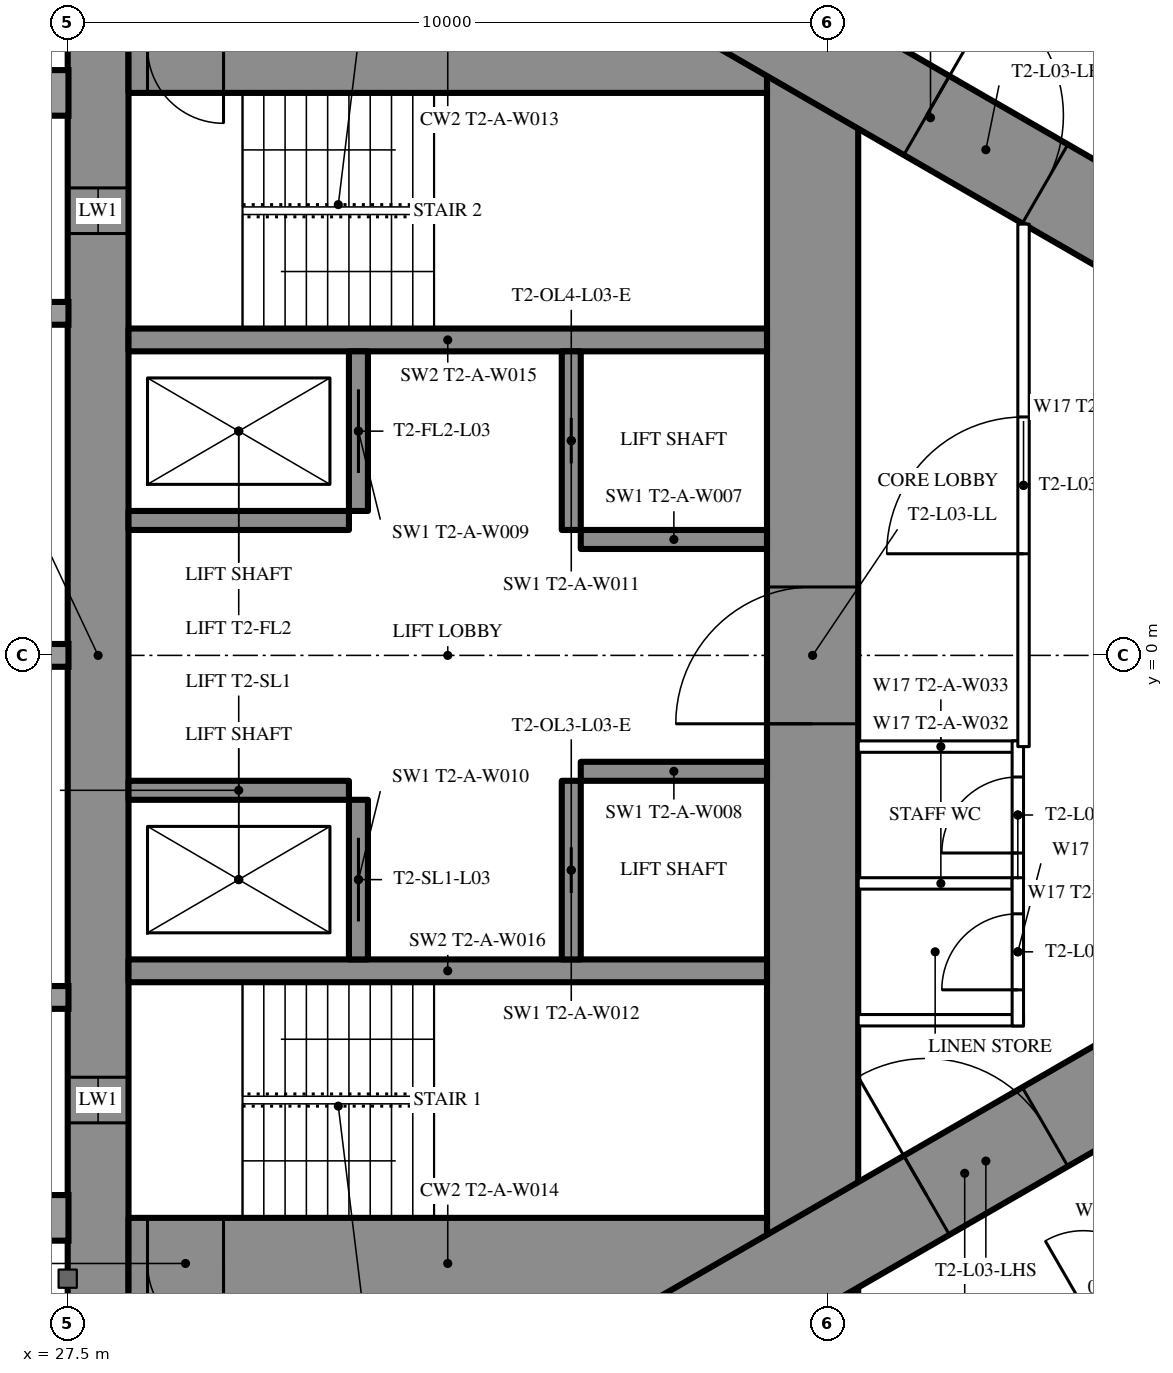
"""IFC4 building model, lengths in metres.
Left out: names, types, materials, properties, quantities, classifications, styles, units other than length and angle.
Written with IfcOpenShell. Run it as: python <this file> out.ifc"""

import sys

from ifc_helpers import new_model, si_unit, direction, frame, frame_2d, origin, place, context, subcontext, project, spatial, rectangle, extrude, element, fill, save


model = new_model("IFC4")
c1 = context("Model", 3, precision=1e-05, world=origin(), true_north=direction((0.0, 1.0)))
c2 = subcontext(c1, "Body", "Model", "MODEL_VIEW")
j1 = project(units=[si_unit("LENGTHUNIT", "METRE"), si_unit("PLANEANGLEUNIT", "RADIAN")], contexts=[c1])
p1 = place(None, origin())
s1 = spatial("IfcSite", under=j1, at=p1, CompositionType="ELEMENT")
p2 = place(p1, origin())
s2 = spatial("IfcBuilding", under=s1, at=p2, CompositionType="ELEMENT")
p3 = place(p2, frame((0.0, 0.0, 18.0)))
s3 = spatial("IfcBuildingStorey", under=s2, at=p3, CompositionType="ELEMENT", Elevation=18.0)
p4 = place(p3, frame((27.9, -8.6, 0.0), z_axis=(0.0, 0.0, 1.0), x_axis=(0.0, 1.0, 0.0)))
e1 = element("IfcWall", 1, at=p4, inside=s3, PredefinedType="SHEAR", context=c2, shape_type="SweptSolid", body=[
    extrude(rectangle(XDim=17.2, YDim=0.8, at=frame_2d((8.6, 0.0))), origin(), (0.0, 0.0, 1.0), 3.5),
])
p5 = place(p4, frame((2.45, 0.0, 0.6)))
e2 = element("IfcOpeningElement", 2, at=p5, cuts=e1, PredefinedType="OPENING", context=c2, shape_type="SweptSolid", body=[
    extrude(rectangle(XDim=0.6, YDim=2.1, at=frame_2d((0.3, 1.05))), frame((0.0, 0.41, 0.0), z_axis=(0.0, -1.0, 0.0), x_axis=(1.0, 0.0, 0.0)), (0.0, 0.0, 1.0), 0.82),
])
p6 = place(p4, frame((14.15, 0.0, 0.6)))
e3 = element("IfcOpeningElement", 3, at=p6, cuts=e1, PredefinedType="OPENING", context=c2, shape_type="SweptSolid", body=[
    extrude(rectangle(XDim=0.6, YDim=2.1, at=frame_2d((0.3, 1.05))), frame((0.0, 0.41, 0.0), z_axis=(0.0, -1.0, 0.0), x_axis=(1.0, 0.0, 0.0)), (0.0, 0.0, 1.0), 0.82),
])
p7 = place(p3, frame((37.3, -8.6, 0.0), z_axis=(0.0, 0.0, 1.0), x_axis=(0.0, 1.0, 0.0)))
e4 = element("IfcWall", 4, at=p7, inside=s3, PredefinedType="SHEAR", context=c2, shape_type="SweptSolid", body=[
    extrude(rectangle(XDim=17.2, YDim=1.2, at=frame_2d((8.6, 0.0))), origin(), (0.0, 0.0, 1.0), 3.5),
])
p8 = place(p7, frame((7.7, 0.0, 0.0)))
e5 = element("IfcOpeningElement", 5, at=p8, cuts=e4, PredefinedType="OPENING", context=c2, shape_type="SweptSolid", body=[
    extrude(rectangle(XDim=1.8, YDim=2.2, at=frame_2d((0.9, 1.1))), frame((0.0, 0.61, 0.0), z_axis=(0.0, -1.0, 0.0), x_axis=(1.0, 0.0, 0.0)), (0.0, 0.0, 1.0), 1.22),
])
p9 = place(p3, frame((28.3, -8.0, 0.0), z_axis=(0.0, 0.0, 1.0), x_axis=(1.0, 0.0, 0.0)))
e6 = element("IfcWall", 6, at=p9, inside=s3, PredefinedType="SHEAR", context=c2, shape_type="SweptSolid", body=[
    extrude(rectangle(XDim=8.4, YDim=1.2, at=frame_2d((4.2, 0.0))), origin(), (0.0, 0.0, 1.0), 3.5),
])
p10 = place(p9, frame((0.25, 0.0, 0.0)))
e7 = element("IfcOpeningElement", 7, at=p10, cuts=e6, PredefinedType="OPENING", context=c2, shape_type="SweptSolid", body=[
    extrude(rectangle(XDim=1.0, YDim=2.2, at=frame_2d((0.5, 1.1))), frame((0.0, 0.61, 0.0), z_axis=(0.0, -1.0, 0.0), x_axis=(1.0, 0.0, 0.0)), (0.0, 0.0, 1.0), 1.22),
])
p11 = place(p3, frame((28.3, 8.0, 0.0), z_axis=(0.0, 0.0, 1.0), x_axis=(1.0, 0.0, 0.0)))
e8 = element("IfcWall", 8, at=p11, inside=s3, PredefinedType="SHEAR", context=c2, shape_type="SweptSolid", body=[
    extrude(rectangle(XDim=8.4, YDim=1.2, at=frame_2d((4.2, 0.0))), origin(), (0.0, 0.0, 1.0), 3.5),
])
p12 = place(p11, frame((0.25, 0.0, 0.0)))
e9 = element("IfcOpeningElement", 9, at=p12, cuts=e8, PredefinedType="OPENING", context=c2, shape_type="SweptSolid", body=[
    extrude(rectangle(XDim=1.0, YDim=2.2, at=frame_2d((0.5, 1.1))), frame((0.0, 0.61, 0.0), z_axis=(0.0, -1.0, 0.0), x_axis=(1.0, 0.0, 0.0)), (0.0, 0.0, 1.0), 1.22),
])
for number, where, z_axis, x_axis in (
    (10, (28.3, -4.15, 0.0), (0.0, 0.0, 1.0), (1.0, 0.0, 0.0)),
    (11, (28.3, 4.15, 0.0), (0.0, 0.0, 1.0), (1.0, 0.0, 0.0)),
):
    element("IfcWall", number, at=place(p3, frame(where, z_axis=z_axis, x_axis=x_axis)), inside=s3, PredefinedType="SHEAR", context=c2, shape_type="SweptSolid", body=[
        extrude(rectangle(XDim=8.4, YDim=0.3, at=frame_2d((4.2, 0.0))), origin(), (0.0, 0.0, 1.0), 3.5),
    ])
p13 = place(p3, frame((31.325, -4.0, 0.0), z_axis=(0.0, 0.0, 1.0), x_axis=(0.0, 1.0, 0.0)))
e12 = element("IfcWall", 12, at=p13, inside=s3, PredefinedType="SHEAR", context=c2, shape_type="SweptSolid", body=[
    extrude(rectangle(XDim=2.1, YDim=0.25, at=frame_2d((1.05, 0.0))), origin(), (0.0, 0.0, 1.0), 3.5),
])
p14 = place(p13, frame((0.5, 0.0, 0.0)))
e13 = element("IfcOpeningElement", 13, at=p14, cuts=e12, PredefinedType="OPENING", context=c2, shape_type="SweptSolid", body=[
    extrude(rectangle(XDim=1.1, YDim=2.2, at=frame_2d((0.55, 1.1))), frame((0.0, 0.135, 0.0), z_axis=(0.0, -1.0, 0.0), x_axis=(1.0, 0.0, 0.0)), (0.0, 0.0, 1.0), 0.27),
])
p15 = place(p3, frame((34.125, -4.0, 0.0), z_axis=(0.0, 0.0, 1.0), x_axis=(0.0, 1.0, 0.0)))
e14 = element("IfcWall", 14, at=p15, inside=s3, PredefinedType="SHEAR", context=c2, shape_type="SweptSolid", body=[
    extrude(rectangle(XDim=2.35, YDim=0.25, at=frame_2d((1.175, 0.0))), origin(), (0.0, 0.0, 1.0), 3.5),
])
p16 = place(p15, frame((0.875, 0.0, 0.0)))
e15 = element("IfcOpeningElement", 15, at=p16, cuts=e14, PredefinedType="OPENING", context=c2, shape_type="SweptSolid", body=[
    extrude(rectangle(XDim=0.6, YDim=2.0, at=frame_2d((0.3, 1.0))), frame((0.0, 0.135, 0.0), z_axis=(0.0, -1.0, 0.0), x_axis=(1.0, 0.0, 0.0)), (0.0, 0.0, 1.0), 0.27),
])
p17 = place(p3, frame((28.3, -1.775, 0.0), z_axis=(0.0, 0.0, 1.0), x_axis=(1.0, 0.0, 0.0)))
e16 = element("IfcWall", 16, at=p17, inside=s3, PredefinedType="SHEAR", context=c2, shape_type="SweptSolid", body=[
    extrude(rectangle(XDim=2.9, YDim=0.25, at=frame_2d((1.45, 0.0))), origin(), (0.0, 0.0, 1.0), 3.5),
])
p18 = place(p3, frame((34.25, -1.525, 0.0), z_axis=(0.0, 0.0, 1.0), x_axis=(1.0, 0.0, 0.0)))
e17 = element("IfcWall", 17, at=p18, inside=s3, PredefinedType="SHEAR", context=c2, shape_type="SweptSolid", body=[
    extrude(rectangle(XDim=2.45, YDim=0.25, at=frame_2d((1.225, 0.0))), origin(), (0.0, 0.0, 1.0), 3.5),
])
p19 = place(p3, frame((31.325, 1.9, 0.0), z_axis=(0.0, 0.0, 1.0), x_axis=(0.0, 1.0, 0.0)))
e18 = element("IfcWall", 18, at=p19, inside=s3, PredefinedType="SHEAR", context=c2, shape_type="SweptSolid", body=[
    extrude(rectangle(XDim=2.1, YDim=0.25, at=frame_2d((1.05, 0.0))), origin(), (0.0, 0.0, 1.0), 3.5),
])
p20 = place(p19, frame((0.5, 0.0, 0.0)))
e19 = element("IfcOpeningElement", 19, at=p20, cuts=e18, PredefinedType="OPENING", context=c2, shape_type="SweptSolid", body=[
    extrude(rectangle(XDim=1.1, YDim=2.2, at=frame_2d((0.55, 1.1))), frame((0.0, 0.135, 0.0), z_axis=(0.0, -1.0, 0.0), x_axis=(1.0, 0.0, 0.0)), (0.0, 0.0, 1.0), 0.27),
])
p21 = place(p3, frame((34.125, 1.65, 0.0), z_axis=(0.0, 0.0, 1.0), x_axis=(0.0, 1.0, 0.0)))
e20 = element("IfcWall", 20, at=p21, inside=s3, PredefinedType="SHEAR", context=c2, shape_type="SweptSolid", body=[
    extrude(rectangle(XDim=2.35, YDim=0.25, at=frame_2d((1.175, 0.0))), origin(), (0.0, 0.0, 1.0), 3.5),
])
p22 = place(p21, frame((0.875, 0.0, 0.0)))
e21 = element("IfcOpeningElement", 21, at=p22, cuts=e20, PredefinedType="OPENING", context=c2, shape_type="SweptSolid", body=[
    extrude(rectangle(XDim=0.6, YDim=2.0, at=frame_2d((0.3, 1.0))), frame((0.0, 0.135, 0.0), z_axis=(0.0, -1.0, 0.0), x_axis=(1.0, 0.0, 0.0)), (0.0, 0.0, 1.0), 0.27),
])
p23 = place(p3, frame((28.3, 1.775, 0.0), z_axis=(0.0, 0.0, 1.0), x_axis=(1.0, 0.0, 0.0)))
e22 = element("IfcWall", 22, at=p23, inside=s3, PredefinedType="SHEAR", context=c2, shape_type="SweptSolid", body=[
    extrude(rectangle(XDim=2.9, YDim=0.25, at=frame_2d((1.45, 0.0))), origin(), (0.0, 0.0, 1.0), 3.5),
])
p24 = place(p3, frame((34.25, 1.525, 0.0), z_axis=(0.0, 0.0, 1.0), x_axis=(1.0, 0.0, 0.0)))
e23 = element("IfcWall", 23, at=p24, inside=s3, PredefinedType="SHEAR", context=c2, shape_type="SweptSolid", body=[
    extrude(rectangle(XDim=2.45, YDim=0.25, at=frame_2d((1.225, 0.0))), origin(), (0.0, 0.0, 1.0), 3.5),
])
p25 = place(p3, frame((27.2, -13.8, 0.0), z_axis=(0.0, 0.0, 1.0), x_axis=(0.866027159892, 0.499996958321, 0.0)))
e24 = element("IfcWall", 24, at=p25, inside=s3, PredefinedType="SHEAR", context=c2, shape_type="SweptSolid", body=[
    extrude(rectangle(XDim=27.947, YDim=1.2, at=frame_2d((13.973, 0.0))), origin(), (0.0, 0.0, 1.0), 3.5),
])
p26 = place(p25, frame((4.6, 0.0, 0.0)))
e25 = element("IfcOpeningElement", 25, at=p26, cuts=e24, PredefinedType="OPENING", context=c2, shape_type="SweptSolid", body=[
    extrude(rectangle(XDim=1.0, YDim=2.2, at=frame_2d((0.5, 1.1))), frame((0.0, 0.61, 0.0), z_axis=(0.0, -1.0, 0.0), x_axis=(1.0, 0.0, 0.0)), (0.0, 0.0, 1.0), 1.22),
])
p27 = place(p25, frame((13.395, 0.0, 0.0)))
e26 = element("IfcOpeningElement", 26, at=p27, cuts=e24, PredefinedType="OPENING", context=c2, shape_type="SweptSolid", body=[
    extrude(rectangle(XDim=1.8, YDim=2.2, at=frame_2d((0.9, 1.1))), frame((0.0, 0.61, 0.0), z_axis=(0.0, -1.0, 0.0), x_axis=(1.0, 0.0, 0.0)), (0.0, 0.0, 1.0), 1.22),
])
p28 = place(p3, frame((27.2, 13.8, 0.0), z_axis=(0.0, 0.0, 1.0), x_axis=(0.866024515034, -0.500001539357, 0.0)))
e27 = element("IfcWall", 27, at=p28, inside=s3, PredefinedType="SHEAR", context=c2, shape_type="SweptSolid", body=[
    extrude(rectangle(XDim=26.907, YDim=1.2, at=frame_2d((13.454, 0.0))), origin(), (0.0, 0.0, 1.0), 3.5),
])
p29 = place(p28, frame((4.6, 0.0, 0.0)))
e28 = element("IfcOpeningElement", 28, at=p29, cuts=e27, PredefinedType="OPENING", context=c2, shape_type="SweptSolid", body=[
    extrude(rectangle(XDim=1.0, YDim=2.2, at=frame_2d((0.5, 1.1))), frame((0.0, 0.61, 0.0), z_axis=(0.0, -1.0, 0.0), x_axis=(1.0, 0.0, 0.0)), (0.0, 0.0, 1.0), 1.22),
])
p30 = place(p28, frame((13.395, 0.0, 0.0)))
e29 = element("IfcOpeningElement", 29, at=p30, cuts=e27, PredefinedType="OPENING", context=c2, shape_type="SweptSolid", body=[
    extrude(rectangle(XDim=1.8, YDim=2.2, at=frame_2d((0.9, 1.1))), frame((0.0, 0.61, 0.0), z_axis=(0.0, -1.0, 0.0), x_axis=(1.0, 0.0, 0.0)), (0.0, 0.0, 1.0), 1.22),
])
p31 = place(p3, frame((36.834, 10.894, 0.0), z_axis=(0.0, 0.0, 1.0), x_axis=(0.866028157229, -0.499995230863, 0.0)))
e30 = element("IfcWall", 30, at=p31, inside=s3, PredefinedType="PARTITIONING", context=c2, shape_type="SweptSolid", body=[
    extrude(rectangle(XDim=21.667, YDim=0.2, at=frame_2d((10.833, 0.0))), origin(), (0.0, 0.0, 1.0), 3.25),
])
p32 = place(p31, frame((18.885, 0.0, 0.0)))
e31 = element("IfcOpeningElement", 31, at=p32, cuts=e30, PredefinedType="OPENING", context=c2, shape_type="SweptSolid", body=[
    extrude(rectangle(XDim=0.95, YDim=2.2, at=frame_2d((0.475, 1.1))), frame((0.0, 0.11, 0.0), z_axis=(0.0, -1.0, 0.0), x_axis=(1.0, 0.0, 0.0)), (0.0, 0.0, 1.0), 0.22),
])
p33 = place(p31, frame((14.835, 0.0, 0.0)))
e32 = element("IfcOpeningElement", 32, at=p33, cuts=e30, PredefinedType="OPENING", context=c2, shape_type="SweptSolid", body=[
    extrude(rectangle(XDim=0.95, YDim=2.2, at=frame_2d((0.475, 1.1))), frame((0.0, 0.11, 0.0), z_axis=(0.0, -1.0, 0.0), x_axis=(1.0, 0.0, 0.0)), (0.0, 0.0, 1.0), 0.22),
])
p34 = place(p31, frame((12.85, 0.0, 0.0)))
e33 = element("IfcOpeningElement", 33, at=p34, cuts=e30, PredefinedType="OPENING", context=c2, shape_type="SweptSolid", body=[
    extrude(rectangle(XDim=0.95, YDim=2.2, at=frame_2d((0.475, 1.1))), frame((0.0, 0.11, 0.0), z_axis=(0.0, -1.0, 0.0), x_axis=(1.0, 0.0, 0.0)), (0.0, 0.0, 1.0), 0.22),
])
p35 = place(p31, frame((1.542, 0.0, 0.0)))
e34 = element("IfcOpeningElement", 34, at=p35, cuts=e30, PredefinedType="OPENING", context=c2, shape_type="SweptSolid", body=[
    extrude(rectangle(XDim=0.95, YDim=2.2, at=frame_2d((0.475, 1.1))), frame((0.0, 0.11, 0.0), z_axis=(0.0, -1.0, 0.0), x_axis=(1.0, 0.0, 0.0)), (0.0, 0.0, 1.0), 0.22),
])
p36 = place(p3, frame((37.96, -10.243, 0.0), z_axis=(0.0, 0.0, 1.0), x_axis=(0.866024617314, 0.500001362204, 0.0)))
e35 = element("IfcWall", 35, at=p36, inside=s3, PredefinedType="PARTITIONING", context=c2, shape_type="SweptSolid", body=[
    extrude(rectangle(XDim=8.512, YDim=0.2, at=frame_2d((4.256, 0.0))), origin(), (0.0, 0.0, 1.0), 3.25),
])
p37 = place(p36, frame((3.35, 0.0, 0.0)))
e36 = element("IfcOpeningElement", 36, at=p37, cuts=e35, PredefinedType="OPENING", context=c2, shape_type="SweptSolid", body=[
    extrude(rectangle(XDim=1.0, YDim=2.2, at=frame_2d((0.5, 1.1))), frame((0.0, 0.11, 0.0), z_axis=(0.0, -1.0, 0.0), x_axis=(1.0, 0.0, 0.0)), (0.0, 0.0, 1.0), 0.22),
])
for number, where, z_axis, x_axis in (
    (37, (37.9, -1.2, 0.0), (0.0, 0.0, 1.0), (1.0, 0.0, 0.0)),
    (38, (37.9, -3.0, 0.0), (0.0, 0.0, 1.0), (1.0, 0.0, 0.0)),
    (39, (37.9, -4.8, 0.0), (0.0, 0.0, 1.0), (1.0, 0.0, 0.0)),
):
    element("IfcWall", number, at=place(p3, frame(where, z_axis=z_axis, x_axis=x_axis)), inside=s3, PredefinedType="PARTITIONING", context=c2, shape_type="SweptSolid", body=[
        extrude(rectangle(XDim=2.175, YDim=0.15, at=frame_2d((1.087, 0.0))), origin(), (0.0, 0.0, 1.0), 3.25),
    ])
p38 = place(p3, frame((40.0, -3.075, 0.0), z_axis=(0.0, 0.0, 1.0), x_axis=(0.0, 1.0, 0.0)))
e40 = element("IfcWall", 40, at=p38, inside=s3, PredefinedType="PARTITIONING", context=c2, shape_type="SweptSolid", body=[
    extrude(rectangle(XDim=1.95, YDim=0.15, at=frame_2d((0.975, 0.0))), origin(), (0.0, 0.0, 1.0), 3.25),
])
p39 = place(p38, frame((0.475, 0.0, 0.0)))
e41 = element("IfcOpeningElement", 41, at=p39, cuts=e40, PredefinedType="OPENING", context=c2, shape_type="SweptSolid", body=[
    extrude(rectangle(XDim=1.0, YDim=2.2, at=frame_2d((0.5, 1.1))), frame((0.0, 0.085, 0.0), z_axis=(0.0, -1.0, 0.0), x_axis=(1.0, 0.0, 0.0)), (0.0, 0.0, 1.0), 0.17),
])
p40 = place(p3, frame((40.0, -4.875, 0.0), z_axis=(0.0, 0.0, 1.0), x_axis=(0.0, 1.0, 0.0)))
e42 = element("IfcWall", 42, at=p40, inside=s3, PredefinedType="PARTITIONING", context=c2, shape_type="SweptSolid", body=[
    extrude(rectangle(XDim=1.95, YDim=0.15, at=frame_2d((0.975, 0.0))), origin(), (0.0, 0.0, 1.0), 3.25),
])
p41 = place(p40, frame((0.475, 0.0, 0.0)))
e43 = element("IfcOpeningElement", 43, at=p41, cuts=e42, PredefinedType="OPENING", context=c2, shape_type="SweptSolid", body=[
    extrude(rectangle(XDim=1.0, YDim=2.2, at=frame_2d((0.5, 1.1))), frame((0.0, 0.085, 0.0), z_axis=(0.0, -1.0, 0.0), x_axis=(1.0, 0.0, 0.0)), (0.0, 0.0, 1.0), 0.17),
])
p42 = place(p3, frame((40.075, -1.2, 0.0), z_axis=(0.0, 0.0, 1.0), x_axis=(0.0, 1.0, 0.0)))
e44 = element("IfcWall", 44, at=p42, inside=s3, PredefinedType="PARTITIONING", context=c2, shape_type="SweptSolid", body=[
    extrude(rectangle(XDim=6.874, YDim=0.15, at=frame_2d((3.437, 0.0))), origin(), (0.0, 0.0, 1.0), 3.25),
])
p43 = place(p42, frame((2.537, 0.0, 0.0)))
e45 = element("IfcOpeningElement", 45, at=p43, cuts=e44, PredefinedType="OPENING", context=c2, shape_type="SweptSolid", body=[
    extrude(rectangle(XDim=1.8, YDim=2.2, at=frame_2d((0.9, 1.1))), frame((0.0, 0.085, 0.0), z_axis=(0.0, -1.0, 0.0), x_axis=(1.0, 0.0, 0.0)), (0.0, 0.0, 1.0), 0.17),
])
p44 = place(p37, origin())
e46 = element("IfcDoor", 46, at=p44, inside=s3, OperationType="SINGLE_SWING_LEFT", PredefinedType="DOOR", context=c2, shape_type="SweptSolid", body=[
    extrude(rectangle(XDim=1.0, YDim=2.2, at=frame_2d((0.5, 1.1))), frame((0.0, 0.025, 0.0), z_axis=(0.0, -1.0, 0.0), x_axis=(1.0, 0.0, 0.0)), (0.0, 0.0, 1.0), 0.05),
])
fill(e36, e46)
p45 = place(p39, origin())
e47 = element("IfcDoor", 47, at=p45, inside=s3, OperationType="SINGLE_SWING_LEFT", PredefinedType="DOOR", context=c2, shape_type="SweptSolid", body=[
    extrude(rectangle(XDim=1.0, YDim=2.2, at=frame_2d((0.5, 1.1))), frame((0.0, 0.025, 0.0), z_axis=(0.0, -1.0, 0.0), x_axis=(1.0, 0.0, 0.0)), (0.0, 0.0, 1.0), 0.05),
])
fill(e41, e47)
p46 = place(p41, origin())
e48 = element("IfcDoor", 48, at=p46, inside=s3, OperationType="SINGLE_SWING_LEFT", PredefinedType="DOOR", context=c2, shape_type="SweptSolid", body=[
    extrude(rectangle(XDim=1.0, YDim=2.2, at=frame_2d((0.5, 1.1))), frame((0.0, 0.025, 0.0), z_axis=(0.0, -1.0, 0.0), x_axis=(1.0, 0.0, 0.0)), (0.0, 0.0, 1.0), 0.05),
])
fill(e43, e48)
p47 = place(p43, origin())
e49 = element("IfcDoor", 49, at=p47, inside=s3, OperationType="DOUBLE_DOOR_SINGLE_SWING", PredefinedType="DOOR", context=c2, shape_type="SweptSolid", body=[
    extrude(rectangle(XDim=1.8, YDim=2.2, at=frame_2d((0.9, 1.1))), frame((0.0, 0.025, 0.0), z_axis=(0.0, -1.0, 0.0), x_axis=(1.0, 0.0, 0.0)), (0.0, 0.0, 1.0), 0.05),
])
fill(e45, e49)
p48 = place(p27, origin())
e50 = element("IfcDoor", 50, at=p48, inside=s3, OperationType="DOUBLE_DOOR_SINGLE_SWING", PredefinedType="DOOR", context=c2, shape_type="SweptSolid", body=[
    extrude(rectangle(XDim=1.8, YDim=2.2, at=frame_2d((0.9, 1.1))), frame((0.0, 0.025, 0.0), z_axis=(0.0, -1.0, 0.0), x_axis=(1.0, 0.0, 0.0)), (0.0, 0.0, 1.0), 0.05),
])
fill(e26, e50)
p49 = place(p30, origin())
e51 = element("IfcDoor", 51, at=p49, inside=s3, OperationType="DOUBLE_DOOR_SINGLE_SWING", PredefinedType="DOOR", context=c2, shape_type="SweptSolid", body=[
    extrude(rectangle(XDim=1.8, YDim=2.2, at=frame_2d((0.9, 1.1))), frame((0.0, 0.025, 0.0), z_axis=(0.0, -1.0, 0.0), x_axis=(1.0, 0.0, 0.0)), (0.0, 0.0, 1.0), 0.05),
])
fill(e29, e51)
p50 = place(p8, origin())
e52 = element("IfcDoor", 52, at=p50, inside=s3, OperationType="DOUBLE_DOOR_SINGLE_SWING", PredefinedType="DOOR", context=c2, shape_type="SweptSolid", body=[
    extrude(rectangle(XDim=1.8, YDim=2.2, at=frame_2d((0.9, 1.1))), frame((0.0, 0.025, 0.0), z_axis=(0.0, -1.0, 0.0), x_axis=(1.0, 0.0, 0.0)), (0.0, 0.0, 1.0), 0.05),
])
fill(e5, e52)
p51 = place(p10, origin())
e53 = element("IfcDoor", 53, at=p51, inside=s3, OperationType="SINGLE_SWING_RIGHT", PredefinedType="DOOR", context=c2, shape_type="SweptSolid", body=[
    extrude(rectangle(XDim=1.0, YDim=2.2, at=frame_2d((0.5, 1.1))), frame((0.0, 0.025, 0.0), z_axis=(0.0, -1.0, 0.0), x_axis=(1.0, 0.0, 0.0)), (0.0, 0.0, 1.0), 0.05),
])
fill(e7, e53)
p52 = place(p14, origin())
e54 = element("IfcDoor", 54, at=p52, inside=s3, OperationType="SLIDING_TO_LEFT", PredefinedType="USERDEFINED", context=c2, shape_type="SweptSolid", body=[
    extrude(rectangle(XDim=1.1, YDim=2.2, at=frame_2d((0.55, 1.1))), frame((0.0, 0.025, 0.0), z_axis=(0.0, -1.0, 0.0), x_axis=(1.0, 0.0, 0.0)), (0.0, 0.0, 1.0), 0.05),
])
fill(e13, e54)
p53 = place(p20, origin())
e55 = element("IfcDoor", 55, at=p53, inside=s3, OperationType="SLIDING_TO_LEFT", PredefinedType="USERDEFINED", context=c2, shape_type="SweptSolid", body=[
    extrude(rectangle(XDim=1.1, YDim=2.2, at=frame_2d((0.55, 1.1))), frame((0.0, 0.025, 0.0), z_axis=(0.0, -1.0, 0.0), x_axis=(1.0, 0.0, 0.0)), (0.0, 0.0, 1.0), 0.05),
])
fill(e19, e55)
p54 = place(p16, origin())
e56 = element("IfcDoor", 56, at=p54, inside=s3, OperationType="SLIDING_TO_LEFT", PredefinedType="DOOR", context=c2, shape_type="SweptSolid", body=[
    extrude(rectangle(XDim=0.6, YDim=2.0, at=frame_2d((0.3, 1.0))), frame((0.0, 0.025, 0.0), z_axis=(0.0, -1.0, 0.0), x_axis=(1.0, 0.0, 0.0)), (0.0, 0.0, 1.0), 0.05),
])
fill(e15, e56)
p55 = place(p22, origin())
e57 = element("IfcDoor", 57, at=p55, inside=s3, OperationType="SLIDING_TO_LEFT", PredefinedType="DOOR", context=c2, shape_type="SweptSolid", body=[
    extrude(rectangle(XDim=0.6, YDim=2.0, at=frame_2d((0.3, 1.0))), frame((0.0, 0.025, 0.0), z_axis=(0.0, -1.0, 0.0), x_axis=(1.0, 0.0, 0.0)), (0.0, 0.0, 1.0), 0.05),
])
fill(e21, e57)
p56 = place(p5, origin())
e58 = element("IfcWindow", 58, at=p56, inside=s3, PartitioningType="SINGLE_PANEL", PredefinedType="WINDOW", context=c2, shape_type="SweptSolid", body=[
    extrude(rectangle(XDim=0.6, YDim=2.1, at=frame_2d((0.3, 1.05))), frame((0.0, 0.03, 0.0), z_axis=(0.0, -1.0, 0.0), x_axis=(1.0, 0.0, 0.0)), (0.0, 0.0, 1.0), 0.06),
])
fill(e2, e58)
p57 = place(p6, origin())
e59 = element("IfcWindow", 59, at=p57, inside=s3, PartitioningType="SINGLE_PANEL", PredefinedType="WINDOW", context=c2, shape_type="SweptSolid", body=[
    extrude(rectangle(XDim=0.6, YDim=2.1, at=frame_2d((0.3, 1.05))), frame((0.0, 0.03, 0.0), z_axis=(0.0, -1.0, 0.0), x_axis=(1.0, 0.0, 0.0)), (0.0, 0.0, 1.0), 0.06),
])
fill(e3, e59)
save(model, sys.argv[1])
